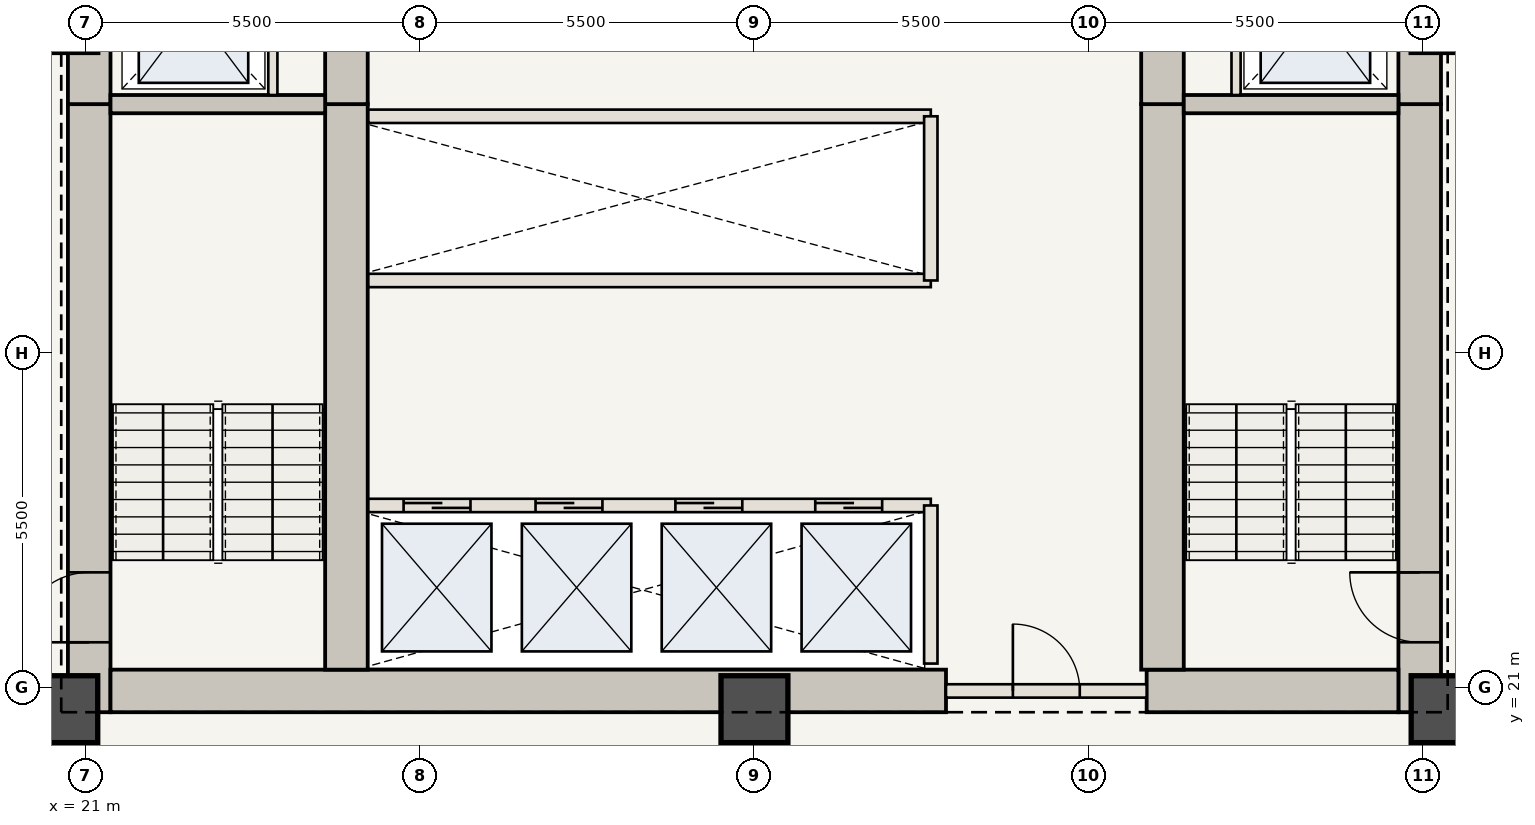
"""IFC4 building model, lengths in metres.
Left out: names, types, materials, properties, quantities, classifications, styles, units other than length and angle.
Written with IfcOpenShell. Run it as: python <this file> out.ifc"""

import sys

from ifc_helpers import new_model, si_unit, direction, frame, frame_2d, origin, origin_2d, place, context, subcontext, project, spatial, rectangle, extrude, element, fill, save


model = new_model("IFC4")
c1 = context("Model", 3, precision=1e-05, world=origin(), true_north=direction((0.0, 1.0)))
c2 = subcontext(c1, "Body", "Model", "MODEL_VIEW")
j1 = project(units=[si_unit("LENGTHUNIT", "METRE"), si_unit("PLANEANGLEUNIT", "RADIAN")], contexts=[c1])
p1 = place(None, origin())
s1 = spatial("IfcSite", under=j1, at=p1, CompositionType="ELEMENT")
p2 = place(p1, origin())
s2 = spatial("IfcBuilding", under=s1, at=p2, CompositionType="ELEMENT")
p3 = place(p2, frame((0.0, 0.0, 63.35)))
s3 = spatial("IfcBuildingStorey", under=s2, at=p3, CompositionType="ELEMENT", Elevation=63.35)
p4 = place(p3, frame((21.06, 20.6, 0.0), z_axis=(0.0, 0.0, 1.0), x_axis=(0.0, 1.0, 0.0)))
e1 = element("IfcWall", 1, at=p4, inside=s3, PredefinedType="SHEAR", context=c2, shape_type="SweptSolid", body=[
    extrude(rectangle(XDim=10.0, YDim=0.7, at=frame_2d((5.0, 0.0))), origin(), (0.0, 0.0, 1.0), 3.5),
])
p5 = place(p4, frame((1.15, 0.0, 0.0)))
e2 = element("IfcOpeningElement", 2, at=p5, cuts=e1, PredefinedType="OPENING", context=c2, shape_type="SweptSolid", body=[
    extrude(rectangle(XDim=1.15, YDim=2.15, at=frame_2d((0.575, 1.075))), frame((0.0, 0.36, 0.0), z_axis=(0.0, -1.0, 0.0), x_axis=(1.0, 0.0, 0.0)), (0.0, 0.0, 1.0), 0.72),
])
p6 = place(p3, frame((21.06, 30.6, 0.0), z_axis=(0.0, 0.0, 1.0), x_axis=(0.0, 1.0, 0.0)))
e3 = element("IfcWall", 3, at=p6, inside=s3, PredefinedType="SHEAR", context=c2, shape_type="SweptSolid", body=[
    extrude(rectangle(XDim=12.75, YDim=0.7, at=frame_2d((6.375, 0.0))), origin(), (0.0, 0.0, 1.0), 3.5),
])
p7 = place(p6, frame((4.2, 0.0, 0.0)))
e4 = element("IfcOpeningElement", 4, at=p7, cuts=e3, PredefinedType="OPENING", context=c2, shape_type="SweptSolid", body=[
    extrude(rectangle(XDim=1.1, YDim=2.15, at=frame_2d((0.55, 1.075))), frame((0.0, 0.36, 0.0), z_axis=(0.0, -1.0, 0.0), x_axis=(1.0, 0.0, 0.0)), (0.0, 0.0, 1.0), 0.72),
])
p8 = place(p6, frame((8.05, 0.0, 0.0)))
e5 = element("IfcOpeningElement", 5, at=p8, cuts=e3, PredefinedType="OPENING", context=c2, shape_type="SweptSolid", body=[
    extrude(rectangle(XDim=0.92, YDim=2.1, at=frame_2d((0.46, 1.05))), frame((0.0, 0.36, 0.0), z_axis=(0.0, -1.0, 0.0), x_axis=(1.0, 0.0, 0.0)), (0.0, 0.0, 1.0), 0.72),
])
p9 = place(p6, frame((9.45, 0.0, 0.0)))
e6 = element("IfcOpeningElement", 6, at=p9, cuts=e3, PredefinedType="OPENING", context=c2, shape_type="SweptSolid", body=[
    extrude(rectangle(XDim=0.88, YDim=2.1, at=frame_2d((0.44, 1.05))), frame((0.0, 0.36, 0.0), z_axis=(0.0, -1.0, 0.0), x_axis=(1.0, 0.0, 0.0)), (0.0, 0.0, 1.0), 0.72),
])
p10 = place(p6, frame((10.85, 0.0, 0.0)))
e7 = element("IfcOpeningElement", 7, at=p10, cuts=e3, PredefinedType="OPENING", context=c2, shape_type="SweptSolid", body=[
    extrude(rectangle(XDim=0.88, YDim=2.1, at=frame_2d((0.44, 1.05))), frame((0.0, 0.36, 0.0), z_axis=(0.0, -1.0, 0.0), x_axis=(1.0, 0.0, 0.0)), (0.0, 0.0, 1.0), 0.72),
])
p11 = place(p3, frame((42.94, 20.6, 0.0), z_axis=(0.0, 0.0, 1.0), x_axis=(0.0, 1.0, 0.0)))
e8 = element("IfcWall", 8, at=p11, inside=s3, PredefinedType="SHEAR", context=c2, shape_type="SweptSolid", body=[
    extrude(rectangle(XDim=10.0, YDim=0.7, at=frame_2d((5.0, 0.0))), origin(), (0.0, 0.0, 1.0), 3.5),
])
p12 = place(p11, frame((1.15, 0.0, 0.0)))
e9 = element("IfcOpeningElement", 9, at=p12, cuts=e8, PredefinedType="OPENING", context=c2, shape_type="SweptSolid", body=[
    extrude(rectangle(XDim=1.15, YDim=2.15, at=frame_2d((0.575, 1.075))), frame((0.0, 0.36, 0.0), z_axis=(0.0, -1.0, 0.0), x_axis=(1.0, 0.0, 0.0)), (0.0, 0.0, 1.0), 0.72),
])
p13 = place(p3, frame((42.94, 30.6, 0.0), z_axis=(0.0, 0.0, 1.0), x_axis=(0.0, 1.0, 0.0)))
e10 = element("IfcWall", 10, at=p13, inside=s3, PredefinedType="SHEAR", context=c2, shape_type="SweptSolid", body=[
    extrude(rectangle(XDim=12.75, YDim=0.7, at=frame_2d((6.375, 0.0))), origin(), (0.0, 0.0, 1.0), 3.5),
])
p14 = place(p13, frame((4.2, 0.0, 0.0)))
e11 = element("IfcOpeningElement", 11, at=p14, cuts=e10, PredefinedType="OPENING", context=c2, shape_type="SweptSolid", body=[
    extrude(rectangle(XDim=1.1, YDim=2.15, at=frame_2d((0.55, 1.075))), frame((0.0, 0.36, 0.0), z_axis=(0.0, -1.0, 0.0), x_axis=(1.0, 0.0, 0.0)), (0.0, 0.0, 1.0), 0.72),
])
p15 = place(p13, frame((9.2, 0.0, 0.0)))
e12 = element("IfcOpeningElement", 12, at=p15, cuts=e10, PredefinedType="OPENING", context=c2, shape_type="SweptSolid", body=[
    extrude(rectangle(XDim=0.92, YDim=2.1, at=frame_2d((0.46, 1.05))), frame((0.0, 0.36, 0.0), z_axis=(0.0, -1.0, 0.0), x_axis=(1.0, 0.0, 0.0)), (0.0, 0.0, 1.0), 0.72),
])
p16 = place(p3, frame((21.41, 20.95, 0.0), z_axis=(0.0, 0.0, 1.0), x_axis=(1.0, 0.0, 0.0)))
e13 = element("IfcWall", 13, at=p16, inside=s3, PredefinedType="SHEAR", context=c2, shape_type="SweptSolid", body=[
    extrude(rectangle(XDim=13.74, YDim=0.7, at=frame_2d((6.87, 0.0))), origin(), (0.0, 0.0, 1.0), 3.5),
])
p17 = place(p3, frame((38.45, 20.95, 0.0), z_axis=(0.0, 0.0, 1.0), x_axis=(1.0, 0.0, 0.0)))
e14 = element("IfcWall", 14, at=p17, inside=s3, PredefinedType="SHEAR", context=c2, shape_type="SweptSolid", body=[
    extrude(rectangle(XDim=4.14, YDim=0.7, at=frame_2d((2.07, 0.0))), origin(), (0.0, 0.0, 1.0), 3.5),
])
p18 = place(p3, frame((25.29, 21.3, 0.0), z_axis=(0.0, 0.0, 1.0), x_axis=(0.0, 1.0, 0.0)))
e15 = element("IfcWall", 15, at=p18, inside=s3, PredefinedType="SHEAR", context=c2, shape_type="SweptSolid", body=[
    extrude(rectangle(XDim=9.3, YDim=0.7, at=frame_2d((4.65, 0.0))), origin(), (0.0, 0.0, 1.0), 3.5),
])
p19 = place(p3, frame((25.29, 30.6, 0.0), z_axis=(0.0, 0.0, 1.0), x_axis=(0.0, 1.0, 0.0)))
e16 = element("IfcWall", 16, at=p19, inside=s3, PredefinedType="SHEAR", context=c2, shape_type="SweptSolid", body=[
    extrude(rectangle(XDim=12.05, YDim=0.7, at=frame_2d((6.025, 0.0))), origin(), (0.0, 0.0, 1.0), 3.5),
])
p20 = place(p19, frame((6.25, 0.0, 0.0)))
e17 = element("IfcOpeningElement", 17, at=p20, cuts=e16, PredefinedType="OPENING", context=c2, shape_type="SweptSolid", body=[
    extrude(rectangle(XDim=1.1, YDim=2.15, at=frame_2d((0.55, 1.075))), frame((0.0, 0.36, 0.0), z_axis=(0.0, -1.0, 0.0), x_axis=(1.0, 0.0, 0.0)), (0.0, 0.0, 1.0), 0.72),
])
p21 = place(p3, frame((38.71, 21.3, 0.0), z_axis=(0.0, 0.0, 1.0), x_axis=(0.0, 1.0, 0.0)))
e18 = element("IfcWall", 18, at=p21, inside=s3, PredefinedType="SHEAR", context=c2, shape_type="SweptSolid", body=[
    extrude(rectangle(XDim=9.3, YDim=0.7, at=frame_2d((4.65, 0.0))), origin(), (0.0, 0.0, 1.0), 3.5),
])
p22 = place(p3, frame((38.71, 30.6, 0.0), z_axis=(0.0, 0.0, 1.0), x_axis=(0.0, 1.0, 0.0)))
e19 = element("IfcWall", 19, at=p22, inside=s3, PredefinedType="SHEAR", context=c2, shape_type="SweptSolid", body=[
    extrude(rectangle(XDim=12.05, YDim=0.7, at=frame_2d((6.025, 0.0))), origin(), (0.0, 0.0, 1.0), 3.5),
])
for number, where, z_axis, x_axis in (
    (20, (20.65, 20.65, 0.0), (0.0, 0.0, 1.0), (1.0, 0.0, 0.0)),
    (21, (32.0, 20.65, 0.0), (0.0, 0.0, 1.0), (1.0, 0.0, 0.0)),
    (22, (43.35, 20.65, 0.0), (0.0, 0.0, 1.0), (1.0, 0.0, 0.0)),
):
    element("IfcColumn", number, at=place(p3, frame(where, z_axis=z_axis, x_axis=x_axis)), inside=s3, PredefinedType="COLUMN", context=c2, shape_type="SweptSolid", body=[
        extrude(rectangle(XDim=1.1, YDim=1.1, at=origin_2d()), origin(), (0.0, 0.0, 1.0), 3.5),
    ])
for number, where, z_axis, x_axis in (
    (23, (21.41, 30.6, 0.0), (0.0, 0.0, 1.0), (1.0, 0.0, 0.0)),
    (24, (39.06, 30.6, 0.0), (0.0, 0.0, 1.0), (1.0, 0.0, 0.0)),
):
    element("IfcWall", number, at=place(p3, frame(where, z_axis=z_axis, x_axis=x_axis)), inside=s3, PredefinedType="SHEAR", context=c2, shape_type="SweptSolid", body=[
        extrude(rectangle(XDim=3.53, YDim=0.3, at=frame_2d((1.765, 0.0))), origin(), (0.0, 0.0, 1.0), 3.32),
    ])
for number, where, z_axis, x_axis in (
    (25, (24.08, 30.75, 0.0), (0.0, 0.0, 1.0), (0.0, 1.0, 0.0)),
    (26, (39.92, 30.75, 0.0), (0.0, 0.0, 1.0), (0.0, 1.0, 0.0)),
):
    element("IfcWall", number, at=place(p3, frame(where, z_axis=z_axis, x_axis=x_axis)), inside=s3, PredefinedType="STANDARD", context=c2, shape_type="SweptSolid", body=[
        extrude(rectangle(XDim=2.65, YDim=0.15, at=frame_2d((1.325, 0.0))), origin(), (0.0, 0.0, 1.0), 3.32),
    ])
p23 = place(p3, frame((35.15, 20.95, 0.0), z_axis=(0.0, 0.0, 1.0), x_axis=(1.0, 0.0, 0.0)))
e27 = element("IfcWall", 27, at=p23, inside=s3, PredefinedType="STANDARD", context=c2, shape_type="SweptSolid", body=[
    extrude(rectangle(XDim=3.3, YDim=0.22, at=frame_2d((1.65, 0.0))), origin(), (0.0, 0.0, 1.0), 3.32),
])
p24 = place(p23, frame((1.1, 0.0, 0.0)))
e28 = element("IfcOpeningElement", 28, at=p24, cuts=e27, PredefinedType="OPENING", context=c2, shape_type="SweptSolid", body=[
    extrude(rectangle(XDim=1.1, YDim=2.15, at=frame_2d((0.55, 1.075))), frame((0.0, 0.12, 0.0), z_axis=(0.0, -1.0, 0.0), x_axis=(1.0, 0.0, 0.0)), (0.0, 0.0, 1.0), 0.24),
])
p25 = place(p3, frame((25.65, 24.0, 0.0), z_axis=(0.0, 0.0, 1.0), x_axis=(1.0, 0.0, 0.0)))
e29 = element("IfcWall", 29, at=p25, inside=s3, PredefinedType="STANDARD", context=c2, shape_type="SweptSolid", body=[
    extrude(rectangle(XDim=9.25, YDim=0.22, at=frame_2d((4.625, 0.0))), origin(), (0.0, 0.0, 1.0), 3.32),
])
p26 = place(p25, frame((0.58, 0.0, 0.0)))
e30 = element("IfcOpeningElement", 30, at=p26, cuts=e29, PredefinedType="OPENING", context=c2, shape_type="SweptSolid", body=[
    extrude(rectangle(XDim=1.1, YDim=2.15, at=frame_2d((0.55, 1.075))), frame((0.0, 0.12, 0.0), z_axis=(0.0, -1.0, 0.0), x_axis=(1.0, 0.0, 0.0)), (0.0, 0.0, 1.0), 0.24),
])
p27 = place(p25, frame((2.75, 0.0, 0.0)))
e31 = element("IfcOpeningElement", 31, at=p27, cuts=e29, PredefinedType="OPENING", context=c2, shape_type="SweptSolid", body=[
    extrude(rectangle(XDim=1.1, YDim=2.15, at=frame_2d((0.55, 1.075))), frame((0.0, 0.12, 0.0), z_axis=(0.0, -1.0, 0.0), x_axis=(1.0, 0.0, 0.0)), (0.0, 0.0, 1.0), 0.24),
])
p28 = place(p25, frame((5.05, 0.0, 0.0)))
e32 = element("IfcOpeningElement", 32, at=p28, cuts=e29, PredefinedType="OPENING", context=c2, shape_type="SweptSolid", body=[
    extrude(rectangle(XDim=1.1, YDim=2.15, at=frame_2d((0.55, 1.075))), frame((0.0, 0.12, 0.0), z_axis=(0.0, -1.0, 0.0), x_axis=(1.0, 0.0, 0.0)), (0.0, 0.0, 1.0), 0.24),
])
p29 = place(p25, frame((7.35, 0.0, 0.0)))
e33 = element("IfcOpeningElement", 33, at=p29, cuts=e29, PredefinedType="OPENING", context=c2, shape_type="SweptSolid", body=[
    extrude(rectangle(XDim=1.1, YDim=2.15, at=frame_2d((0.55, 1.075))), frame((0.0, 0.12, 0.0), z_axis=(0.0, -1.0, 0.0), x_axis=(1.0, 0.0, 0.0)), (0.0, 0.0, 1.0), 0.24),
])
p30 = place(p3, frame((34.9, 21.4, 0.0), z_axis=(0.0, 0.0, 1.0), x_axis=(0.0, 1.0, 0.0)))
e34 = element("IfcWall", 34, at=p30, inside=s3, PredefinedType="STANDARD", context=c2, shape_type="SweptSolid", body=[
    extrude(rectangle(XDim=2.6, YDim=0.22, at=frame_2d((1.3, 0.0))), origin(), (0.0, 0.0, 1.0), 3.32),
])
for number, where, z_axis, x_axis in (
    (35, (25.65, 27.7, 0.0), (0.0, 0.0, 1.0), (1.0, 0.0, 0.0)),
    (36, (25.65, 30.4, 0.0), (0.0, 0.0, 1.0), (1.0, 0.0, 0.0)),
):
    element("IfcWall", number, at=place(p3, frame(where, z_axis=z_axis, x_axis=x_axis)), inside=s3, PredefinedType="STANDARD", context=c2, shape_type="SweptSolid", body=[
        extrude(rectangle(XDim=9.25, YDim=0.22, at=frame_2d((4.625, 0.0))), origin(), (0.0, 0.0, 1.0), 3.32),
    ])
p31 = place(p3, frame((34.9, 27.7, 0.0), z_axis=(0.0, 0.0, 1.0), x_axis=(0.0, 1.0, 0.0)))
e37 = element("IfcWall", 37, at=p31, inside=s3, PredefinedType="STANDARD", context=c2, shape_type="SweptSolid", body=[
    extrude(rectangle(XDim=2.7, YDim=0.22, at=frame_2d((1.35, 0.0))), origin(), (0.0, 0.0, 1.0), 3.32),
])
p32 = place(p5, origin())
e38 = element("IfcDoor", 38, at=p32, inside=s3, OperationType="SINGLE_SWING_LEFT", PredefinedType="DOOR", context=c2, shape_type="SweptSolid", body=[
    extrude(rectangle(XDim=1.15, YDim=2.15, at=frame_2d((0.575, 1.075))), frame((0.0, 0.025, 0.0), z_axis=(0.0, -1.0, 0.0), x_axis=(1.0, 0.0, 0.0)), (0.0, 0.0, 1.0), 0.05),
])
fill(e2, e38)
p33 = place(p12, origin())
e39 = element("IfcDoor", 39, at=p33, inside=s3, OperationType="SINGLE_SWING_RIGHT", PredefinedType="DOOR", context=c2, shape_type="SweptSolid", body=[
    extrude(rectangle(XDim=1.15, YDim=2.15, at=frame_2d((0.575, 1.075))), frame((0.0, 0.025, 0.0), z_axis=(0.0, -1.0, 0.0), x_axis=(1.0, 0.0, 0.0)), (0.0, 0.0, 1.0), 0.05),
])
fill(e9, e39)
p34 = place(p24, origin())
e40 = element("IfcDoor", 40, at=p34, inside=s3, OperationType="SINGLE_SWING_LEFT", PredefinedType="DOOR", context=c2, shape_type="SweptSolid", body=[
    extrude(rectangle(XDim=1.1, YDim=2.15, at=frame_2d((0.55, 1.075))), frame((0.0, 0.025, 0.0), z_axis=(0.0, -1.0, 0.0), x_axis=(1.0, 0.0, 0.0)), (0.0, 0.0, 1.0), 0.05),
])
fill(e28, e40)
p35 = place(p26, origin())
e41 = element("IfcDoor", 41, at=p35, inside=s3, OperationType="DOUBLE_DOOR_SLIDING", PredefinedType="DOOR", context=c2, shape_type="SweptSolid", body=[
    extrude(rectangle(XDim=1.1, YDim=2.15, at=frame_2d((0.55, 1.075))), frame((0.0, 0.025, 0.0), z_axis=(0.0, -1.0, 0.0), x_axis=(1.0, 0.0, 0.0)), (0.0, 0.0, 1.0), 0.05),
])
fill(e30, e41)
p36 = place(p27, origin())
e42 = element("IfcDoor", 42, at=p36, inside=s3, OperationType="DOUBLE_DOOR_SLIDING", PredefinedType="DOOR", context=c2, shape_type="SweptSolid", body=[
    extrude(rectangle(XDim=1.1, YDim=2.15, at=frame_2d((0.55, 1.075))), frame((0.0, 0.025, 0.0), z_axis=(0.0, -1.0, 0.0), x_axis=(1.0, 0.0, 0.0)), (0.0, 0.0, 1.0), 0.05),
])
fill(e31, e42)
p37 = place(p28, origin())
e43 = element("IfcDoor", 43, at=p37, inside=s3, OperationType="DOUBLE_DOOR_SLIDING", PredefinedType="DOOR", context=c2, shape_type="SweptSolid", body=[
    extrude(rectangle(XDim=1.1, YDim=2.15, at=frame_2d((0.55, 1.075))), frame((0.0, 0.025, 0.0), z_axis=(0.0, -1.0, 0.0), x_axis=(1.0, 0.0, 0.0)), (0.0, 0.0, 1.0), 0.05),
])
fill(e32, e43)
p38 = place(p29, origin())
e44 = element("IfcDoor", 44, at=p38, inside=s3, OperationType="DOUBLE_DOOR_SLIDING", PredefinedType="DOOR", context=c2, shape_type="SweptSolid", body=[
    extrude(rectangle(XDim=1.1, YDim=2.15, at=frame_2d((0.55, 1.075))), frame((0.0, 0.025, 0.0), z_axis=(0.0, -1.0, 0.0), x_axis=(1.0, 0.0, 0.0)), (0.0, 0.0, 1.0), 0.05),
])
fill(e33, e44)
save(model, sys.argv[1])
